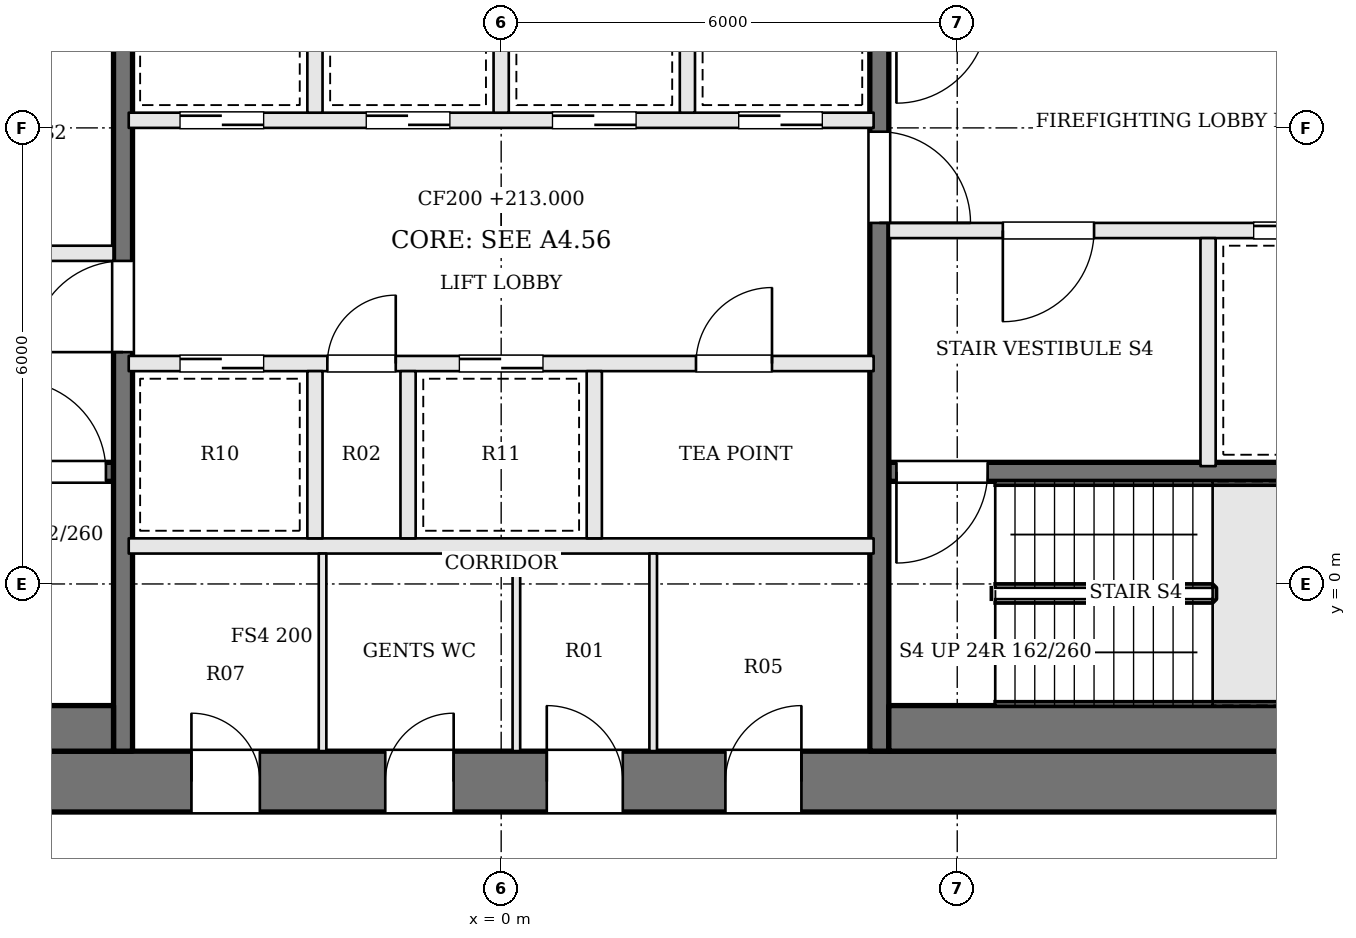
"""IFC4 building model, lengths in metres.
Left out: names, types, materials, properties, quantities, classifications, styles, units other than length and angle.
Written with IfcOpenShell. Run it as: python <this file> out.ifc"""

import sys

from ifc_helpers import new_model, si_unit, direction, frame, frame_2d, origin, place, context, subcontext, project, spatial, rectangle, extrude, element, fill, save


model = new_model("IFC4")
c1 = context("Model", 3, precision=1e-05, world=origin(), true_north=direction((0.0, 1.0)))
c2 = subcontext(c1, "Body", "Model", "MODEL_VIEW")
j1 = project(units=[si_unit("LENGTHUNIT", "METRE"), si_unit("PLANEANGLEUNIT", "RADIAN")], contexts=[c1])
p1 = place(None, origin())
s1 = spatial("IfcSite", under=j1, at=p1, CompositionType="ELEMENT")
p2 = place(p1, origin())
s2 = spatial("IfcBuilding", under=s1, at=p2, CompositionType="ELEMENT")
p3 = place(p2, frame((0.0, 0.0, 213.0)))
s3 = spatial("IfcBuildingStorey", under=s2, at=p3, CompositionType="ELEMENT", Elevation=213.0)
p4 = place(p3, frame((-13.0, -2.6, 0.0), z_axis=(0.0, 0.0, 1.0), x_axis=(1.0, 0.0, 0.0)))
e1 = element("IfcWall", 1, at=p4, inside=s3, PredefinedType="SHEAR", context=c2, shape_type="SweptSolid", body=[
    extrude(rectangle(XDim=26.0, YDim=0.8, at=frame_2d((13.0, 0.0))), origin(), (0.0, 0.0, 1.0), 3.9),
])
p5 = place(p4, frame((8.925, 0.0, 0.0)))
e2 = element("IfcOpeningElement", 2, at=p5, cuts=e1, PredefinedType="OPENING", context=c2, shape_type="SweptSolid", body=[
    extrude(rectangle(XDim=0.9, YDim=2.1, at=frame_2d((0.45, 1.05))), frame((0.0, 0.41, 0.0), z_axis=(0.0, -1.0, 0.0), x_axis=(1.0, 0.0, 0.0)), (0.0, 0.0, 1.0), 0.82),
])
p6 = place(p4, frame((11.475, 0.0, 0.0)))
e3 = element("IfcOpeningElement", 3, at=p6, cuts=e1, PredefinedType="OPENING", context=c2, shape_type="SweptSolid", body=[
    extrude(rectangle(XDim=0.9, YDim=2.1, at=frame_2d((0.45, 1.05))), frame((0.0, 0.41, 0.0), z_axis=(0.0, -1.0, 0.0), x_axis=(1.0, 0.0, 0.0)), (0.0, 0.0, 1.0), 0.82),
])
p7 = place(p4, frame((13.6, 0.0, 0.0)))
e4 = element("IfcOpeningElement", 4, at=p7, cuts=e1, PredefinedType="OPENING", context=c2, shape_type="SweptSolid", body=[
    extrude(rectangle(XDim=1.0, YDim=2.1, at=frame_2d((0.5, 1.05))), frame((0.0, 0.41, 0.0), z_axis=(0.0, -1.0, 0.0), x_axis=(1.0, 0.0, 0.0)), (0.0, 0.0, 1.0), 0.82),
])
p8 = place(p4, frame((15.95, 0.0, 0.0)))
e5 = element("IfcOpeningElement", 5, at=p8, cuts=e1, PredefinedType="OPENING", context=c2, shape_type="SweptSolid", body=[
    extrude(rectangle(XDim=1.0, YDim=2.1, at=frame_2d((0.5, 1.05))), frame((0.0, 0.41, 0.0), z_axis=(0.0, -1.0, 0.0), x_axis=(1.0, 0.0, 0.0)), (0.0, 0.0, 1.0), 0.82),
])
p9 = place(p3, frame((-12.2, 1.475, 0.0), z_axis=(0.0, 0.0, 1.0), x_axis=(1.0, 0.0, 0.0)))
e6 = element("IfcWall", 6, at=p9, inside=s3, PredefinedType="SOLIDWALL", context=c2, shape_type="SweptSolid", body=[
    extrude(rectangle(XDim=7.1, YDim=0.25, at=frame_2d((3.55, 0.0))), origin(), (0.0, 0.0, 1.0), 3.6),
])
p10 = place(p9, frame((5.8, 0.0, 0.0)))
e7 = element("IfcOpeningElement", 7, at=p10, cuts=e6, PredefinedType="OPENING", context=c2, shape_type="SweptSolid", body=[
    extrude(rectangle(XDim=1.2, YDim=2.1, at=frame_2d((0.6, 1.05))), frame((0.0, 0.135, 0.0), z_axis=(0.0, -1.0, 0.0), x_axis=(1.0, 0.0, 0.0)), (0.0, 0.0, 1.0), 0.27),
])
p11 = place(p3, frame((-12.2, 4.35, 0.0), z_axis=(0.0, 0.0, 1.0), x_axis=(1.0, 0.0, 0.0)))
e8 = element("IfcWall", 8, at=p11, inside=s3, PredefinedType="SOLIDWALL", context=c2, shape_type="SweptSolid", body=[
    extrude(rectangle(XDim=7.1, YDim=0.2, at=frame_2d((3.55, 0.0))), origin(), (0.0, 0.0, 1.0), 3.6),
])
p12 = place(p11, frame((4.4, 0.0, 0.0)))
e9 = element("IfcOpeningElement", 9, at=p12, cuts=e8, PredefinedType="OPENING", context=c2, shape_type="SweptSolid", body=[
    extrude(rectangle(XDim=1.2, YDim=2.1, at=frame_2d((0.6, 1.05))), frame((0.0, 0.11, 0.0), z_axis=(0.0, -1.0, 0.0), x_axis=(1.0, 0.0, 0.0)), (0.0, 0.0, 1.0), 0.22),
])
p13 = place(p11, frame((1.1, 0.0, 0.0)))
e10 = element("IfcOpeningElement", 10, at=p13, cuts=e8, PredefinedType="OPENING", context=c2, shape_type="SweptSolid", body=[
    extrude(rectangle(XDim=1.2, YDim=2.1, at=frame_2d((0.6, 1.05))), frame((0.0, 0.11, 0.0), z_axis=(0.0, -1.0, 0.0), x_axis=(1.0, 0.0, 0.0)), (0.0, 0.0, 1.0), 0.22),
])
p14 = place(p3, frame((12.2, 4.65, 0.0), z_axis=(0.0, 0.0, 1.0), x_axis=(-1.0, 0.0, 0.0)))
e11 = element("IfcWall", 11, at=p14, inside=s3, PredefinedType="SOLIDWALL", context=c2, shape_type="SweptSolid", body=[
    extrude(rectangle(XDim=7.1, YDim=0.2, at=frame_2d((3.55, 0.0))), origin(), (0.0, 0.0, 1.0), 3.6),
])
p15 = place(p14, frame((4.4, 0.0, 0.0)))
e12 = element("IfcOpeningElement", 12, at=p15, cuts=e11, PredefinedType="OPENING", context=c2, shape_type="SweptSolid", body=[
    extrude(rectangle(XDim=1.2, YDim=2.1, at=frame_2d((0.6, 1.05))), frame((0.0, 0.11, 0.0), z_axis=(0.0, -1.0, 0.0), x_axis=(1.0, 0.0, 0.0)), (0.0, 0.0, 1.0), 0.22),
])
p16 = place(p14, frame((1.1, 0.0, 0.0)))
e13 = element("IfcOpeningElement", 13, at=p16, cuts=e11, PredefinedType="OPENING", context=c2, shape_type="SweptSolid", body=[
    extrude(rectangle(XDim=1.2, YDim=2.1, at=frame_2d((0.6, 1.05))), frame((0.0, 0.11, 0.0), z_axis=(0.0, -1.0, 0.0), x_axis=(1.0, 0.0, 0.0)), (0.0, 0.0, 1.0), 0.22),
])
p17 = place(p3, frame((12.2, 1.475, 0.0), z_axis=(0.0, 0.0, 1.0), x_axis=(-1.0, 0.0, 0.0)))
e14 = element("IfcWall", 14, at=p17, inside=s3, PredefinedType="SOLIDWALL", context=c2, shape_type="SweptSolid", body=[
    extrude(rectangle(XDim=7.1, YDim=0.25, at=frame_2d((3.55, 0.0))), origin(), (0.0, 0.0, 1.0), 3.6),
])
p18 = place(p17, frame((5.8, 0.0, 0.0)))
e15 = element("IfcOpeningElement", 15, at=p18, cuts=e14, PredefinedType="OPENING", context=c2, shape_type="SweptSolid", body=[
    extrude(rectangle(XDim=1.2, YDim=2.1, at=frame_2d((0.6, 1.05))), frame((0.0, 0.135, 0.0), z_axis=(0.0, -1.0, 0.0), x_axis=(1.0, 0.0, 0.0)), (0.0, 0.0, 1.0), 0.27),
])
p19 = place(p3, frame((9.3, 4.55, 0.0), z_axis=(0.0, 0.0, 1.0), x_axis=(0.0, -1.0, 0.0)))
e16 = element("IfcWall", 16, at=p19, inside=s3, PredefinedType="SOLIDWALL", context=c2, shape_type="SweptSolid", body=[
    extrude(rectangle(XDim=3.0, YDim=0.2, at=frame_2d((1.5, 0.0))), origin(), (0.0, 0.0, 1.0), 3.6),
])
p20 = place(p3, frame((-4.975, -2.2, 0.0), z_axis=(0.0, 0.0, 1.0), x_axis=(0.0, 1.0, 0.0)))
e17 = element("IfcWall", 17, at=p20, inside=s3, PredefinedType="SOLIDWALL", context=c2, shape_type="SweptSolid", body=[
    extrude(rectangle(XDim=13.4, YDim=0.25, at=frame_2d((6.7, 0.0))), origin(), (0.0, 0.0, 1.0), 3.6),
])
p21 = place(p20, frame((5.25, 0.0, 0.0)))
e18 = element("IfcOpeningElement", 18, at=p21, cuts=e17, PredefinedType="OPENING", context=c2, shape_type="SweptSolid", body=[
    extrude(rectangle(XDim=1.2, YDim=2.1, at=frame_2d((0.6, 1.05))), frame((0.0, 0.135, 0.0), z_axis=(0.0, -1.0, 0.0), x_axis=(1.0, 0.0, 0.0)), (0.0, 0.0, 1.0), 0.27),
])
p22 = place(p3, frame((4.975, 11.2, 0.0), z_axis=(0.0, 0.0, 1.0), x_axis=(0.0, -1.0, 0.0)))
e19 = element("IfcWall", 19, at=p22, inside=s3, PredefinedType="SOLIDWALL", context=c2, shape_type="SweptSolid", body=[
    extrude(rectangle(XDim=13.4, YDim=0.25, at=frame_2d((6.7, 0.0))), origin(), (0.0, 0.0, 1.0), 3.6),
])
p23 = place(p22, frame((5.25, 0.0, 0.0)))
e20 = element("IfcOpeningElement", 20, at=p23, cuts=e19, PredefinedType="OPENING", context=c2, shape_type="SweptSolid", body=[
    extrude(rectangle(XDim=1.2, YDim=2.1, at=frame_2d((0.6, 1.05))), frame((0.0, 0.135, 0.0), z_axis=(0.0, -1.0, 0.0), x_axis=(1.0, 0.0, 0.0)), (0.0, 0.0, 1.0), 0.27),
])
for number, where, z_axis, x_axis in (
    (21, (-12.2, -1.9, 0.0), (0.0, 0.0, 1.0), (1.0, 0.0, 0.0)),
    (22, (12.2, -1.9, 0.0), (0.0, 0.0, 1.0), (-1.0, 0.0, 0.0)),
):
    element("IfcWall", number, at=place(p3, frame(where, z_axis=z_axis, x_axis=x_axis)), inside=s3, PredefinedType="SOLIDWALL", context=c2, shape_type="SweptSolid", body=[
        extrude(rectangle(XDim=7.1, YDim=0.6, at=frame_2d((3.55, 0.0))), origin(), (0.0, 0.0, 1.0), 3.6),
    ])
p24 = place(p3, frame((-4.9, 0.5, 0.0), z_axis=(0.0, 0.0, 1.0), x_axis=(1.0, 0.0, 0.0)))
e23 = element("IfcWall", 23, at=p24, inside=s3, PredefinedType="SOLIDWALL", context=c2, shape_type="SweptSolid", body=[
    extrude(rectangle(XDim=9.8, YDim=0.2, at=frame_2d((4.9, 0.0))), origin(), (0.0, 0.0, 1.0), 3.6),
])
p25 = place(p3, frame((-4.9, 2.9, 0.0), z_axis=(0.0, 0.0, 1.0), x_axis=(1.0, 0.0, 0.0)))
e24 = element("IfcWall", 24, at=p25, inside=s3, PredefinedType="SOLIDWALL", context=c2, shape_type="SweptSolid", body=[
    extrude(rectangle(XDim=9.8, YDim=0.2, at=frame_2d((4.9, 0.0))), origin(), (0.0, 0.0, 1.0), 3.6),
])
p26 = place(p25, frame((0.675, 0.0, 0.0)))
e25 = element("IfcOpeningElement", 25, at=p26, cuts=e24, PredefinedType="OPENING", context=c2, shape_type="SweptSolid", body=[
    extrude(rectangle(XDim=1.1, YDim=2.1, at=frame_2d((0.55, 1.05))), frame((0.0, 0.11, 0.0), z_axis=(0.0, -1.0, 0.0), x_axis=(1.0, 0.0, 0.0)), (0.0, 0.0, 1.0), 0.22),
])
p27 = place(p25, frame((2.613, 0.0, 0.0)))
e26 = element("IfcOpeningElement", 26, at=p27, cuts=e24, PredefinedType="OPENING", context=c2, shape_type="SweptSolid", body=[
    extrude(rectangle(XDim=0.9, YDim=2.1, at=frame_2d((0.45, 1.05))), frame((0.0, 0.11, 0.0), z_axis=(0.0, -1.0, 0.0), x_axis=(1.0, 0.0, 0.0)), (0.0, 0.0, 1.0), 0.22),
])
p28 = place(p25, frame((4.35, 0.0, 0.0)))
e27 = element("IfcOpeningElement", 27, at=p28, cuts=e24, PredefinedType="OPENING", context=c2, shape_type="SweptSolid", body=[
    extrude(rectangle(XDim=1.1, YDim=2.1, at=frame_2d((0.55, 1.05))), frame((0.0, 0.11, 0.0), z_axis=(0.0, -1.0, 0.0), x_axis=(1.0, 0.0, 0.0)), (0.0, 0.0, 1.0), 0.22),
])
p29 = place(p25, frame((7.463, 0.0, 0.0)))
e28 = element("IfcOpeningElement", 28, at=p29, cuts=e24, PredefinedType="OPENING", context=c2, shape_type="SweptSolid", body=[
    extrude(rectangle(XDim=1.0, YDim=2.1, at=frame_2d((0.5, 1.05))), frame((0.0, 0.11, 0.0), z_axis=(0.0, -1.0, 0.0), x_axis=(1.0, 0.0, 0.0)), (0.0, 0.0, 1.0), 0.22),
])
p30 = place(p3, frame((-4.9, 6.1, 0.0), z_axis=(0.0, 0.0, 1.0), x_axis=(1.0, 0.0, 0.0)))
e29 = element("IfcWall", 29, at=p30, inside=s3, PredefinedType="SOLIDWALL", context=c2, shape_type="SweptSolid", body=[
    extrude(rectangle(XDim=9.8, YDim=0.2, at=frame_2d((4.9, 0.0))), origin(), (0.0, 0.0, 1.0), 3.6),
])
p31 = place(p30, frame((0.675, 0.0, 0.0)))
e30 = element("IfcOpeningElement", 30, at=p31, cuts=e29, PredefinedType="OPENING", context=c2, shape_type="SweptSolid", body=[
    extrude(rectangle(XDim=1.1, YDim=2.1, at=frame_2d((0.55, 1.05))), frame((0.0, 0.11, 0.0), z_axis=(0.0, -1.0, 0.0), x_axis=(1.0, 0.0, 0.0)), (0.0, 0.0, 1.0), 0.22),
])
p32 = place(p30, frame((3.125, 0.0, 0.0)))
e31 = element("IfcOpeningElement", 31, at=p32, cuts=e29, PredefinedType="OPENING", context=c2, shape_type="SweptSolid", body=[
    extrude(rectangle(XDim=1.1, YDim=2.1, at=frame_2d((0.55, 1.05))), frame((0.0, 0.11, 0.0), z_axis=(0.0, -1.0, 0.0), x_axis=(1.0, 0.0, 0.0)), (0.0, 0.0, 1.0), 0.22),
])
p33 = place(p30, frame((5.575, 0.0, 0.0)))
e32 = element("IfcOpeningElement", 32, at=p33, cuts=e29, PredefinedType="OPENING", context=c2, shape_type="SweptSolid", body=[
    extrude(rectangle(XDim=1.1, YDim=2.1, at=frame_2d((0.55, 1.05))), frame((0.0, 0.11, 0.0), z_axis=(0.0, -1.0, 0.0), x_axis=(1.0, 0.0, 0.0)), (0.0, 0.0, 1.0), 0.22),
])
p34 = place(p30, frame((8.025, 0.0, 0.0)))
e33 = element("IfcOpeningElement", 33, at=p34, cuts=e29, PredefinedType="OPENING", context=c2, shape_type="SweptSolid", body=[
    extrude(rectangle(XDim=1.1, YDim=2.1, at=frame_2d((0.55, 1.05))), frame((0.0, 0.11, 0.0), z_axis=(0.0, -1.0, 0.0), x_axis=(1.0, 0.0, 0.0)), (0.0, 0.0, 1.0), 0.22),
])
for number, where, z_axis, x_axis in (
    (34, (-2.45, 0.6, 0.0), (0.0, 0.0, 1.0), (0.0, 1.0, 0.0)),
    (35, (-1.225, 0.6, 0.0), (0.0, 0.0, 1.0), (0.0, 1.0, 0.0)),
    (36, (1.225, 0.6, 0.0), (0.0, 0.0, 1.0), (0.0, 1.0, 0.0)),
    (37, (-2.45, 6.2, 0.0), (0.0, 0.0, 1.0), (0.0, 1.0, 0.0)),
    (38, (0.0, 6.2, 0.0), (0.0, 0.0, 1.0), (0.0, 1.0, 0.0)),
    (39, (2.45, 6.2, 0.0), (0.0, 0.0, 1.0), (0.0, 1.0, 0.0)),
):
    element("IfcWall", number, at=place(p3, frame(where, z_axis=z_axis, x_axis=x_axis)), inside=s3, PredefinedType="SOLIDWALL", context=c2, shape_type="SweptSolid", body=[
        extrude(rectangle(XDim=2.2, YDim=0.2, at=frame_2d((1.1, 0.0))), origin(), (0.0, 0.0, 1.0), 3.6),
    ])
for number, where, z_axis, x_axis in (
    (40, (-2.35, -2.2, 0.0), (0.0, 0.0, 1.0), (0.0, 1.0, 0.0)),
    (41, (0.2, -2.2, 0.0), (0.0, 0.0, 1.0), (0.0, 1.0, 0.0)),
    (42, (2.0, -2.2, 0.0), (0.0, 0.0, 1.0), (0.0, 1.0, 0.0)),
):
    element("IfcWall", number, at=place(p3, frame(where, z_axis=z_axis, x_axis=x_axis)), inside=s3, PredefinedType="PARTITIONING", context=c2, shape_type="SweptSolid", body=[
        extrude(rectangle(XDim=2.6, YDim=0.1, at=frame_2d((1.3, 0.0))), origin(), (0.0, 0.0, 1.0), 3.6),
    ])
p35 = place(p21, origin())
e43 = element("IfcDoor", 43, at=p35, inside=s3, OperationType="SINGLE_SWING_LEFT", PredefinedType="DOOR", context=c2, shape_type="SweptSolid", body=[
    extrude(rectangle(XDim=1.2, YDim=2.1, at=frame_2d((0.6, 1.05))), frame((0.0, 0.025, 0.0), z_axis=(0.0, -1.0, 0.0), x_axis=(1.0, 0.0, 0.0)), (0.0, 0.0, 1.0), 0.05),
])
fill(e18, e43)
p36 = place(p23, origin())
e44 = element("IfcDoor", 44, at=p36, inside=s3, OperationType="SINGLE_SWING_RIGHT", PredefinedType="DOOR", context=c2, shape_type="SweptSolid", body=[
    extrude(rectangle(XDim=1.2, YDim=2.1, at=frame_2d((0.6, 1.05))), frame((0.0, 0.025, 0.0), z_axis=(0.0, -1.0, 0.0), x_axis=(1.0, 0.0, 0.0)), (0.0, 0.0, 1.0), 0.05),
])
fill(e20, e44)
p37 = place(p15, origin())
e45 = element("IfcDoor", 45, at=p37, inside=s3, OperationType="SINGLE_SWING_RIGHT", PredefinedType="DOOR", context=c2, shape_type="SweptSolid", body=[
    extrude(rectangle(XDim=1.2, YDim=2.1, at=frame_2d((0.6, 1.05))), frame((0.0, 0.025, 0.0), z_axis=(0.0, -1.0, 0.0), x_axis=(1.0, 0.0, 0.0)), (0.0, 0.0, 1.0), 0.05),
])
fill(e12, e45)
p38 = place(p10, origin())
e46 = element("IfcDoor", 46, at=p38, inside=s3, OperationType="SINGLE_SWING_LEFT", PredefinedType="DOOR", context=c2, shape_type="SweptSolid", body=[
    extrude(rectangle(XDim=1.2, YDim=2.1, at=frame_2d((0.6, 1.05))), frame((0.0, 0.025, 0.0), z_axis=(0.0, -1.0, 0.0), x_axis=(1.0, 0.0, 0.0)), (0.0, 0.0, 1.0), 0.05),
])
fill(e7, e46)
p39 = place(p18, origin())
e47 = element("IfcDoor", 47, at=p39, inside=s3, OperationType="SINGLE_SWING_RIGHT", PredefinedType="DOOR", context=c2, shape_type="SweptSolid", body=[
    extrude(rectangle(XDim=1.2, YDim=2.1, at=frame_2d((0.6, 1.05))), frame((0.0, 0.025, 0.0), z_axis=(0.0, -1.0, 0.0), x_axis=(1.0, 0.0, 0.0)), (0.0, 0.0, 1.0), 0.05),
])
fill(e15, e47)
p40 = place(p16, origin())
e48 = element("IfcDoor", 48, at=p40, inside=s3, OperationType="SLIDING_TO_RIGHT", PredefinedType="DOOR", context=c2, shape_type="SweptSolid", body=[
    extrude(rectangle(XDim=1.2, YDim=2.1, at=frame_2d((0.6, 1.05))), frame((0.0, 0.025, 0.0), z_axis=(0.0, -1.0, 0.0), x_axis=(1.0, 0.0, 0.0)), (0.0, 0.0, 1.0), 0.05),
])
fill(e13, e48)
p41 = place(p26, origin())
e49 = element("IfcDoor", 49, at=p41, inside=s3, OperationType="SLIDING_TO_RIGHT", PredefinedType="DOOR", context=c2, shape_type="SweptSolid", body=[
    extrude(rectangle(XDim=1.1, YDim=2.1, at=frame_2d((0.55, 1.05))), frame((0.0, 0.025, 0.0), z_axis=(0.0, -1.0, 0.0), x_axis=(1.0, 0.0, 0.0)), (0.0, 0.0, 1.0), 0.05),
])
fill(e25, e49)
p42 = place(p27, origin())
e50 = element("IfcDoor", 50, at=p42, inside=s3, OperationType="SINGLE_SWING_RIGHT", PredefinedType="DOOR", context=c2, shape_type="SweptSolid", body=[
    extrude(rectangle(XDim=0.9, YDim=2.1, at=frame_2d((0.45, 1.05))), frame((0.0, 0.025, 0.0), z_axis=(0.0, -1.0, 0.0), x_axis=(1.0, 0.0, 0.0)), (0.0, 0.0, 1.0), 0.05),
])
fill(e26, e50)
p43 = place(p28, origin())
e51 = element("IfcDoor", 51, at=p43, inside=s3, OperationType="SLIDING_TO_LEFT", PredefinedType="DOOR", context=c2, shape_type="SweptSolid", body=[
    extrude(rectangle(XDim=1.1, YDim=2.1, at=frame_2d((0.55, 1.05))), frame((0.0, 0.025, 0.0), z_axis=(0.0, -1.0, 0.0), x_axis=(1.0, 0.0, 0.0)), (0.0, 0.0, 1.0), 0.05),
])
fill(e27, e51)
p44 = place(p29, origin())
e52 = element("IfcDoor", 52, at=p44, inside=s3, OperationType="SINGLE_SWING_RIGHT", PredefinedType="DOOR", context=c2, shape_type="SweptSolid", body=[
    extrude(rectangle(XDim=1.0, YDim=2.1, at=frame_2d((0.5, 1.05))), frame((0.0, 0.025, 0.0), z_axis=(0.0, -1.0, 0.0), x_axis=(1.0, 0.0, 0.0)), (0.0, 0.0, 1.0), 0.05),
])
fill(e28, e52)
p45 = place(p31, origin())
e53 = element("IfcDoor", 53, at=p45, inside=s3, OperationType="SLIDING_TO_RIGHT", PredefinedType="DOOR", context=c2, shape_type="SweptSolid", body=[
    extrude(rectangle(XDim=1.1, YDim=2.1, at=frame_2d((0.55, 1.05))), frame((0.0, 0.025, 0.0), z_axis=(0.0, -1.0, 0.0), x_axis=(1.0, 0.0, 0.0)), (0.0, 0.0, 1.0), 0.05),
])
fill(e30, e53)
p46 = place(p32, origin())
e54 = element("IfcDoor", 54, at=p46, inside=s3, OperationType="SLIDING_TO_LEFT", PredefinedType="DOOR", context=c2, shape_type="SweptSolid", body=[
    extrude(rectangle(XDim=1.1, YDim=2.1, at=frame_2d((0.55, 1.05))), frame((0.0, 0.025, 0.0), z_axis=(0.0, -1.0, 0.0), x_axis=(1.0, 0.0, 0.0)), (0.0, 0.0, 1.0), 0.05),
])
fill(e31, e54)
p47 = place(p33, origin())
e55 = element("IfcDoor", 55, at=p47, inside=s3, OperationType="SLIDING_TO_RIGHT", PredefinedType="DOOR", context=c2, shape_type="SweptSolid", body=[
    extrude(rectangle(XDim=1.1, YDim=2.1, at=frame_2d((0.55, 1.05))), frame((0.0, 0.025, 0.0), z_axis=(0.0, -1.0, 0.0), x_axis=(1.0, 0.0, 0.0)), (0.0, 0.0, 1.0), 0.05),
])
fill(e32, e55)
p48 = place(p34, origin())
e56 = element("IfcDoor", 56, at=p48, inside=s3, OperationType="SLIDING_TO_LEFT", PredefinedType="DOOR", context=c2, shape_type="SweptSolid", body=[
    extrude(rectangle(XDim=1.1, YDim=2.1, at=frame_2d((0.55, 1.05))), frame((0.0, 0.025, 0.0), z_axis=(0.0, -1.0, 0.0), x_axis=(1.0, 0.0, 0.0)), (0.0, 0.0, 1.0), 0.05),
])
fill(e33, e56)
p49 = place(p5, origin())
e57 = element("IfcDoor", 57, at=p49, inside=s3, OperationType="SINGLE_SWING_LEFT", PredefinedType="DOOR", context=c2, shape_type="SweptSolid", body=[
    extrude(rectangle(XDim=0.9, YDim=2.1, at=frame_2d((0.45, 1.05))), frame((0.0, 0.025, 0.0), z_axis=(0.0, -1.0, 0.0), x_axis=(1.0, 0.0, 0.0)), (0.0, 0.0, 1.0), 0.05),
])
fill(e2, e57)
p50 = place(p6, origin())
e58 = element("IfcDoor", 58, at=p50, inside=s3, OperationType="SINGLE_SWING_RIGHT", PredefinedType="DOOR", context=c2, shape_type="SweptSolid", body=[
    extrude(rectangle(XDim=0.9, YDim=2.1, at=frame_2d((0.45, 1.05))), frame((0.0, 0.025, 0.0), z_axis=(0.0, -1.0, 0.0), x_axis=(1.0, 0.0, 0.0)), (0.0, 0.0, 1.0), 0.05),
])
fill(e3, e58)
p51 = place(p7, origin())
e59 = element("IfcDoor", 59, at=p51, inside=s3, OperationType="SINGLE_SWING_LEFT", PredefinedType="DOOR", context=c2, shape_type="SweptSolid", body=[
    extrude(rectangle(XDim=1.0, YDim=2.1, at=frame_2d((0.5, 1.05))), frame((0.0, 0.025, 0.0), z_axis=(0.0, -1.0, 0.0), x_axis=(1.0, 0.0, 0.0)), (0.0, 0.0, 1.0), 0.05),
])
fill(e4, e59)
p52 = place(p8, origin())
e60 = element("IfcDoor", 60, at=p52, inside=s3, OperationType="SINGLE_SWING_RIGHT", PredefinedType="DOOR", context=c2, shape_type="SweptSolid", body=[
    extrude(rectangle(XDim=1.0, YDim=2.1, at=frame_2d((0.5, 1.05))), frame((0.0, 0.025, 0.0), z_axis=(0.0, -1.0, 0.0), x_axis=(1.0, 0.0, 0.0)), (0.0, 0.0, 1.0), 0.05),
])
fill(e5, e60)
save(model, sys.argv[1])
